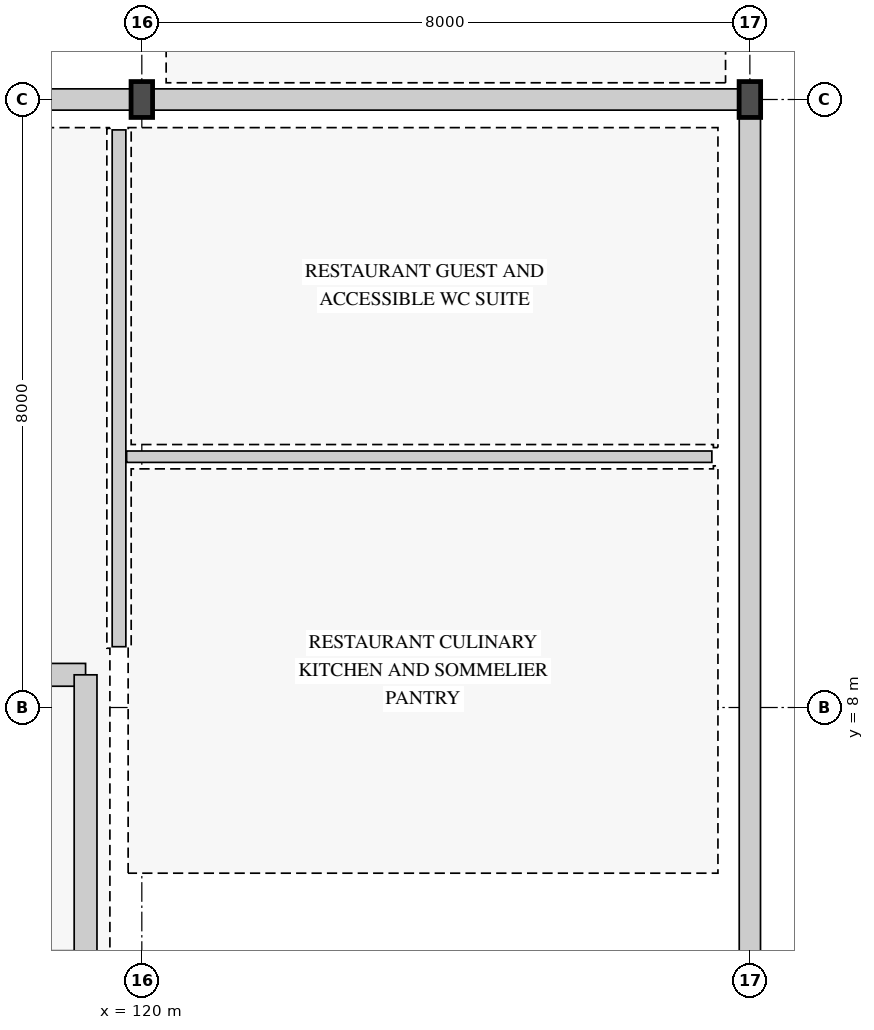
"""IFC4 building model, lengths in metres.
Left out: names, types, materials, properties, quantities, classifications, styles, units other than length and angle.
Written with IfcOpenShell. Run it as: python <this file> out.ifc"""

import sys

from ifc_helpers import new_model, si_unit, direction, frame, frame_2d, origin, origin_2d, place, context, subcontext, project, spatial, rectangle, i_section, extrude, element, fill, save


model = new_model("IFC4")
c1 = context("Model", 3, precision=1e-05, world=origin(), true_north=direction((0.0, 1.0)))
c2 = subcontext(c1, "Body", "Model", "MODEL_VIEW")
j1 = project(units=[si_unit("LENGTHUNIT", "METRE"), si_unit("PLANEANGLEUNIT", "RADIAN")], contexts=[c1])
p1 = place(None, origin())
s1 = spatial("IfcSite", under=j1, at=p1, CompositionType="ELEMENT")
p2 = place(p1, origin())
s2 = spatial("IfcBuilding", under=s1, at=p2, CompositionType="ELEMENT")
p3 = place(p2, frame((0.0, 0.0, 9.6)))
s3 = spatial("IfcBuildingStorey", under=s2, at=p3, CompositionType="ELEMENT", Elevation=9.6)
for number, where, z_axis, x_axis in (
    (1, (120.0, 16.0, 0.0), (0.0, 0.0, 1.0), (1.0, 0.0, 0.0)),
    (2, (128.0, 16.0, 0.0), (0.0, 0.0, 1.0), (1.0, 0.0, 0.0)),
):
    element("IfcColumn", number, at=place(p3, frame(where, z_axis=z_axis, x_axis=x_axis)), inside=s3, PredefinedType="COLUMN", context=c2, shape_type="SweptSolid", body=[
        extrude(i_section(OverallWidth=0.283, OverallDepth=0.472, WebThickness=0.014, FlangeThickness=0.022, FilletRadius=0.015, at=origin_2d()), origin(), (0.0, 0.0, 1.0), 5.4),
    ])
p4 = place(p3, frame((112.006, 16.0, 0.0), z_axis=(0.0, 0.0, 1.0), x_axis=(1.0, 0.0, 0.0)))
e3 = element("IfcWall", 3, at=p4, inside=s3, PredefinedType="STANDARD", context=c2, shape_type="SweptSolid", body=[
    extrude(rectangle(XDim=7.988, YDim=0.28, at=frame_2d((3.994, 0.0))), origin(), (0.0, 0.0, 1.0), 4.538),
])
p5 = place(p4, frame((1.906, 0.0, 0.78)))
e4 = element("IfcOpeningElement", 4, at=p5, cuts=e3, PredefinedType="OPENING", context=c2, shape_type="SweptSolid", body=[
    extrude(rectangle(XDim=0.98, YDim=2.15, at=frame_2d((0.49, 1.075))), frame((0.0, 0.15, 0.0), z_axis=(0.0, -1.0, 0.0), x_axis=(1.0, 0.0, 0.0)), (0.0, 0.0, 1.0), 0.3),
])
p6 = place(p4, frame((4.917, 0.0, 0.78)))
e5 = element("IfcOpeningElement", 5, at=p6, cuts=e3, PredefinedType="OPENING", context=c2, shape_type="SweptSolid", body=[
    extrude(rectangle(XDim=1.35, YDim=2.1, at=frame_2d((0.675, 1.05))), frame((0.0, 0.15, 0.0), z_axis=(0.0, -1.0, 0.0), x_axis=(1.0, 0.0, 0.0)), (0.0, 0.0, 1.0), 0.3),
])
p7 = place(p3, frame((120.006, 16.0, 0.0), z_axis=(0.0, 0.0, 1.0), x_axis=(1.0, 0.0, 0.0)))
e6 = element("IfcWall", 6, at=p7, inside=s3, PredefinedType="STANDARD", context=c2, shape_type="SweptSolid", body=[
    extrude(rectangle(XDim=7.988, YDim=0.28, at=frame_2d((3.994, 0.0))), origin(), (0.0, 0.0, 1.0), 4.553),
])
p8 = place(p7, frame((2.2, 0.0, 0.0)))
e7 = element("IfcOpeningElement", 7, at=p8, cuts=e6, PredefinedType="OPENING", context=c2, shape_type="SweptSolid", body=[
    extrude(rectangle(XDim=1.6, YDim=2.4, at=frame_2d((0.8, 1.2))), frame((0.0, 0.15, 0.0), z_axis=(0.0, -1.0, 0.0), x_axis=(1.0, 0.0, 0.0)), (0.0, 0.0, 1.0), 0.3),
])
p9 = place(p3, frame((128.0, 15.764, 0.0), z_axis=(0.0, 0.0, 1.0), x_axis=(0.0, -1.0, 0.0)))
e8 = element("IfcWall", 8, at=p9, inside=s3, PredefinedType="STANDARD", context=c2, shape_type="SweptSolid", body=[
    extrude(rectangle(XDim=15.528, YDim=0.28, at=frame_2d((7.764, 0.0))), origin(), (0.0, 0.0, 1.0), 4.238),
])
p10 = place(p9, frame((9.152, 0.0, 0.8)))
e9 = element("IfcOpeningElement", 9, at=p10, cuts=e8, PredefinedType="OPENING", context=c2, shape_type="SweptSolid", body=[
    extrude(rectangle(XDim=0.95, YDim=2.6, at=frame_2d((0.475, 1.3))), frame((0.0, 0.15, 0.0), z_axis=(0.0, -1.0, 0.0), x_axis=(1.0, 0.0, 0.0)), (0.0, 0.0, 1.0), 0.3),
])
p11 = place(p9, frame((12.258, 0.0, 0.8)))
e10 = element("IfcOpeningElement", 10, at=p11, cuts=e8, PredefinedType="OPENING", context=c2, shape_type="SweptSolid", body=[
    extrude(rectangle(XDim=0.95, YDim=2.6, at=frame_2d((0.475, 1.3))), frame((0.0, 0.15, 0.0), z_axis=(0.0, -1.0, 0.0), x_axis=(1.0, 0.0, 0.0)), (0.0, 0.0, 1.0), 0.3),
])
p12 = place(p9, frame((3.2, 0.0, 0.0)))
e11 = element("IfcOpeningElement", 11, at=p12, cuts=e8, PredefinedType="OPENING", context=c2, shape_type="SweptSolid", body=[
    extrude(rectangle(XDim=1.6, YDim=2.4, at=frame_2d((0.8, 1.2))), frame((0.0, 0.15, 0.0), z_axis=(0.0, -1.0, 0.0), x_axis=(1.0, 0.0, 0.0)), (0.0, 0.0, 1.0), 0.3),
])
p13 = place(p3, frame((111.65, 8.43, 0.0), z_axis=(0.0, 0.0, 1.0), x_axis=(1.0, 0.0, 0.0)))
e12 = element("IfcWall", 12, at=p13, inside=s3, PredefinedType="SHEAR", context=c2, shape_type="SweptSolid", body=[
    extrude(rectangle(XDim=7.61, YDim=0.3, at=frame_2d((3.805, 0.0))), origin(), (0.0, 0.0, 1.0), 5.15),
])
p14 = place(p3, frame((119.26, 8.43, 0.0), z_axis=(0.0, 0.0, 1.0), x_axis=(0.0, -1.0, 0.0)))
e13 = element("IfcWall", 13, at=p14, inside=s3, PredefinedType="SHEAR", context=c2, shape_type="SweptSolid", body=[
    extrude(rectangle(XDim=3.78, YDim=0.3, at=frame_2d((1.89, 0.0))), origin(), (0.0, 0.0, 1.0), 5.15),
])
p15 = place(p3, frame((119.7, 8.8, 0.0), z_axis=(0.0, 0.0, 1.0), x_axis=(0.0, 1.0, 0.0)))
e14 = element("IfcWall", 14, at=p15, inside=s3, PredefinedType="PARTITIONING", context=c2, shape_type="SweptSolid", body=[
    extrude(rectangle(XDim=6.8, YDim=0.18, at=frame_2d((3.4, 0.0))), origin(), (0.0, 0.0, 1.0), 4.215),
])
p16 = place(p15, frame((1.2, 0.0, 0.0)))
e15 = element("IfcOpeningElement", 15, at=p16, cuts=e14, PredefinedType="OPENING", context=c2, shape_type="SweptSolid", body=[
    extrude(rectangle(XDim=1.1, YDim=2.2, at=frame_2d((0.55, 1.1))), frame((0.0, 0.1, 0.0), z_axis=(0.0, -1.0, 0.0), x_axis=(1.0, 0.0, 0.0)), (0.0, 0.0, 1.0), 0.2),
])
p17 = place(p15, frame((4.4, 0.0, 0.0)))
e16 = element("IfcOpeningElement", 16, at=p17, cuts=e14, PredefinedType="OPENING", context=c2, shape_type="SweptSolid", body=[
    extrude(rectangle(XDim=1.0, YDim=2.1, at=frame_2d((0.5, 1.05))), frame((0.0, 0.1, 0.0), z_axis=(0.0, -1.0, 0.0), x_axis=(1.0, 0.0, 0.0)), (0.0, 0.0, 1.0), 0.2),
])
p18 = place(p3, frame((119.8, 11.3, 0.0), z_axis=(0.0, 0.0, 1.0), x_axis=(1.0, 0.0, 0.0)))
e17 = element("IfcWall", 17, at=p18, inside=s3, PredefinedType="PARTITIONING", context=c2, shape_type="SweptSolid", body=[
    extrude(rectangle(XDim=7.7, YDim=0.15, at=frame_2d((3.85, 0.0))), origin(), (0.0, 0.0, 1.0), 4.215),
])
p19 = place(p8, origin())
e18 = element("IfcDoor", 18, at=p19, inside=s3, OperationType="DOUBLE_DOOR_SINGLE_SWING", PredefinedType="DOOR", context=c2, shape_type="SweptSolid", body=[
    extrude(rectangle(XDim=1.6, YDim=2.4, at=frame_2d((0.8, 1.2))), frame((0.0, 0.025, 0.0), z_axis=(0.0, -1.0, 0.0), x_axis=(1.0, 0.0, 0.0)), (0.0, 0.0, 1.0), 0.05),
])
fill(e7, e18)
p20 = place(p10, origin())
e19 = element("IfcWindow", 19, at=p20, inside=s3, PartitioningType="SINGLE_PANEL", PredefinedType="WINDOW", context=c2, shape_type="SweptSolid", body=[
    extrude(rectangle(XDim=0.95, YDim=2.6, at=frame_2d((0.475, 1.3))), frame((0.0, 0.03, 0.0), z_axis=(0.0, -1.0, 0.0), x_axis=(1.0, 0.0, 0.0)), (0.0, 0.0, 1.0), 0.06),
])
fill(e9, e19)
p21 = place(p12, origin())
e20 = element("IfcDoor", 20, at=p21, inside=s3, OperationType="DOUBLE_DOOR_SINGLE_SWING", PredefinedType="DOOR", context=c2, shape_type="SweptSolid", body=[
    extrude(rectangle(XDim=1.6, YDim=2.4, at=frame_2d((0.8, 1.2))), frame((0.0, 0.025, 0.0), z_axis=(0.0, -1.0, 0.0), x_axis=(1.0, 0.0, 0.0)), (0.0, 0.0, 1.0), 0.05),
])
fill(e11, e20)
p22 = place(p16, origin())
e21 = element("IfcDoor", 21, at=p22, inside=s3, OperationType="SINGLE_SWING_RIGHT", PredefinedType="DOOR", context=c2, shape_type="SweptSolid", body=[
    extrude(rectangle(XDim=1.1, YDim=2.2, at=frame_2d((0.55, 1.1))), frame((0.0, 0.025, 0.0), z_axis=(0.0, -1.0, 0.0), x_axis=(1.0, 0.0, 0.0)), (0.0, 0.0, 1.0), 0.05),
])
fill(e15, e21)
p23 = place(p17, origin())
e22 = element("IfcDoor", 22, at=p23, inside=s3, OperationType="SINGLE_SWING_LEFT", PredefinedType="DOOR", context=c2, shape_type="SweptSolid", body=[
    extrude(rectangle(XDim=1.0, YDim=2.1, at=frame_2d((0.5, 1.05))), frame((0.0, 0.025, 0.0), z_axis=(0.0, -1.0, 0.0), x_axis=(1.0, 0.0, 0.0)), (0.0, 0.0, 1.0), 0.05),
])
fill(e16, e22)
save(model, sys.argv[1])
